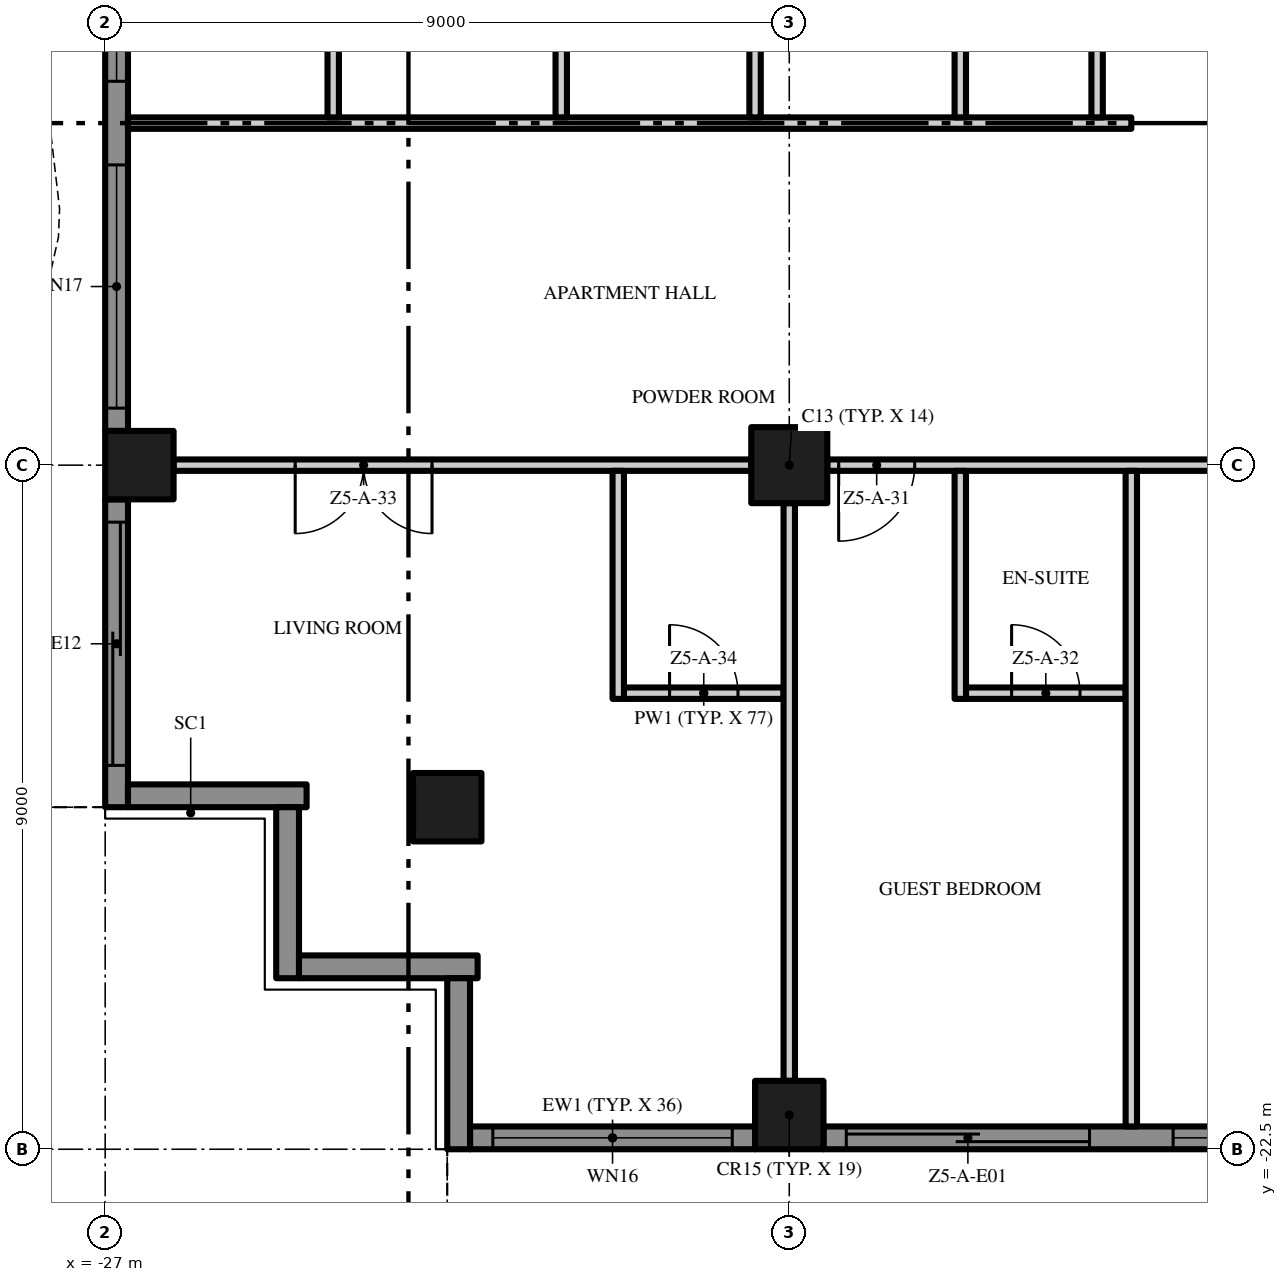
"""IFC4 building model, lengths in metres.
Left out: names, types, materials, properties, quantities, classifications, styles, units other than length and angle.
Written with IfcOpenShell. Run it as: python <this file> out.ifc"""

import sys

from ifc_helpers import new_model, si_unit, direction, frame, frame_2d, origin, origin_2d, place, context, subcontext, project, spatial, polyline, rectangle, outline, extrude, element, fill, save


model = new_model("IFC4")
c1 = context("Model", 3, precision=1e-05, world=origin(), true_north=direction((0.0, 1.0)))
c2 = subcontext(c1, "Body", "Model", "MODEL_VIEW")
j1 = project(units=[si_unit("LENGTHUNIT", "METRE"), si_unit("PLANEANGLEUNIT", "RADIAN")], contexts=[c1])
p1 = place(None, origin())
s1 = spatial("IfcSite", under=j1, at=p1, CompositionType="ELEMENT")
p2 = place(p1, origin())
s2 = spatial("IfcBuilding", under=s1, at=p2, CompositionType="ELEMENT")
p3 = place(p2, frame((0.0, 0.0, 238.8)))
s3 = spatial("IfcBuildingStorey", under=s2, at=p3, CompositionType="ELEMENT", Elevation=238.8)
p4 = place(p3, frame((-18.0, -13.5, 0.0), z_axis=(0.0, 0.0, 1.0), x_axis=(1.0, 0.0, 0.0)))
e1 = element("IfcColumn", 1, at=p4, inside=s3, PredefinedType="COLUMN", context=c2, shape_type="SweptSolid", body=[
    extrude(rectangle(XDim=1.0, YDim=1.0, at=origin_2d()), origin(), (0.0, 0.0, 1.0), 3.5),
])
for number, where, z_axis, x_axis in (
    (2, (-18.0, -22.05, 0.0), (0.0, 0.0, 1.0), (1.0, 0.0, 0.0)),
    (3, (-26.55, -13.5, 0.0), (0.0, 0.0, 1.0), (1.0, 0.0, 0.0)),
    (4, (-22.5, -18.0, 0.0), (0.0, 0.0, 1.0), (1.0, 0.0, 0.0)),
):
    element("IfcColumn", number, at=place(p3, frame(where, z_axis=z_axis, x_axis=x_axis)), inside=s3, PredefinedType="COLUMN", context=c2, shape_type="SweptSolid", body=[
        extrude(rectangle(XDim=0.9, YDim=0.9, at=origin_2d()), origin(), (0.0, 0.0, 1.0), 3.5),
    ])
p5 = place(p3, frame((-18.45, -22.35, 0.0), z_axis=(0.0, 0.0, 1.0), x_axis=(-1.0, 0.0, 0.0)))
e5 = element("IfcWall", 5, at=p5, inside=s3, PredefinedType="SOLIDWALL", context=c2, shape_type="SweptSolid", body=[
    extrude(rectangle(XDim=3.75, YDim=0.3, at=frame_2d((1.875, 0.0))), origin(), (0.0, 0.0, 1.0), 3.5),
])
p6 = place(p5, frame((0.3, 0.0, 0.45)))
e6 = element("IfcOpeningElement", 6, at=p6, cuts=e5, PredefinedType="OPENING", context=c2, shape_type="SweptSolid", body=[
    extrude(rectangle(XDim=3.15, YDim=2.65, at=frame_2d((1.575, 1.325))), frame((0.0, 0.16, 0.0), z_axis=(0.0, -1.0, 0.0), x_axis=(1.0, 0.0, 0.0)), (0.0, 0.0, 1.0), 0.32),
])
p7 = place(p3, frame((-9.45, -22.35, 0.0), z_axis=(0.0, 0.0, 1.0), x_axis=(-1.0, 0.0, 0.0)))
e7 = element("IfcWall", 7, at=p7, inside=s3, PredefinedType="SOLIDWALL", context=c2, shape_type="SweptSolid", body=[
    extrude(rectangle(XDim=8.1, YDim=0.3, at=frame_2d((4.05, 0.0))), origin(), (0.0, 0.0, 1.0), 3.5),
])
p8 = place(p7, frame((4.6, 0.0, 0.0)))
e8 = element("IfcOpeningElement", 8, at=p8, cuts=e7, PredefinedType="OPENING", context=c2, shape_type="SweptSolid", body=[
    extrude(rectangle(XDim=3.2, YDim=2.4, at=frame_2d((1.6, 1.2))), frame((0.0, 0.16, 0.0), z_axis=(0.0, -1.0, 0.0), x_axis=(1.0, 0.0, 0.0)), (0.0, 0.0, 1.0), 0.32),
])
p9 = place(p7, frame((0.3, 0.0, 0.45)))
e9 = element("IfcOpeningElement", 9, at=p9, cuts=e7, PredefinedType="OPENING", context=c2, shape_type="SweptSolid", body=[
    extrude(rectangle(XDim=3.2, YDim=2.65, at=frame_2d((1.6, 1.325))), frame((0.0, 0.16, 0.0), z_axis=(0.0, -1.0, 0.0), x_axis=(1.0, 0.0, 0.0)), (0.0, 0.0, 1.0), 0.32),
])
p10 = place(p3, frame((-26.85, -13.05, 0.0), z_axis=(0.0, 0.0, 1.0), x_axis=(0.0, 1.0, 0.0)))
e10 = element("IfcWall", 10, at=p10, inside=s3, PredefinedType="SOLIDWALL", context=c2, shape_type="SweptSolid", body=[
    extrude(rectangle(XDim=8.1, YDim=0.3, at=frame_2d((4.05, 0.0))), origin(), (0.0, 0.0, 1.0), 3.5),
])
p11 = place(p10, frame((4.6, 0.0, 0.45)))
e11 = element("IfcOpeningElement", 11, at=p11, cuts=e10, PredefinedType="OPENING", context=c2, shape_type="SweptSolid", body=[
    extrude(rectangle(XDim=3.2, YDim=2.65, at=frame_2d((1.6, 1.325))), frame((0.0, 0.16, 0.0), z_axis=(0.0, -1.0, 0.0), x_axis=(1.0, 0.0, 0.0)), (0.0, 0.0, 1.0), 0.32),
])
p12 = place(p10, frame((0.3, 0.0, 0.45)))
e12 = element("IfcOpeningElement", 12, at=p12, cuts=e10, PredefinedType="OPENING", context=c2, shape_type="SweptSolid", body=[
    extrude(rectangle(XDim=3.2, YDim=2.65, at=frame_2d((1.6, 1.325))), frame((0.0, 0.16, 0.0), z_axis=(0.0, -1.0, 0.0), x_axis=(1.0, 0.0, 0.0)), (0.0, 0.0, 1.0), 0.32),
])
p13 = place(p3, frame((-26.85, -18.0, 0.0), z_axis=(0.0, 0.0, 1.0), x_axis=(0.0, 1.0, 0.0)))
e13 = element("IfcWall", 13, at=p13, inside=s3, PredefinedType="SOLIDWALL", context=c2, shape_type="SweptSolid", body=[
    extrude(rectangle(XDim=4.05, YDim=0.3, at=frame_2d((2.025, 0.0))), origin(), (0.0, 0.0, 1.0), 3.5),
])
p14 = place(p13, frame((0.55, 0.0, 0.0)))
e14 = element("IfcOpeningElement", 14, at=p14, cuts=e13, PredefinedType="OPENING", context=c2, shape_type="SweptSolid", body=[
    extrude(rectangle(XDim=3.2, YDim=2.4, at=frame_2d((1.6, 1.2))), frame((0.0, 0.16, 0.0), z_axis=(0.0, -1.0, 0.0), x_axis=(1.0, 0.0, 0.0)), (0.0, 0.0, 1.0), 0.32),
])
p15 = place(p3, frame((-24.35, -17.85, 0.0), z_axis=(0.0, 0.0, 1.0), x_axis=(-1.0, 0.0, 0.0)))
e15 = element("IfcWall", 15, at=p15, inside=s3, PredefinedType="SOLIDWALL", context=c2, shape_type="SweptSolid", body=[
    extrude(rectangle(XDim=2.35, YDim=0.3, at=frame_2d((1.175, 0.0))), origin(), (0.0, 0.0, 1.0), 3.5),
])
p16 = place(p3, frame((-24.6, -20.25, 0.0), z_axis=(0.0, 0.0, 1.0), x_axis=(0.0, 1.0, 0.0)))
e16 = element("IfcWall", 16, at=p16, inside=s3, PredefinedType="SOLIDWALL", context=c2, shape_type="SweptSolid", body=[
    extrude(rectangle(XDim=2.25, YDim=0.3, at=frame_2d((1.125, 0.0))), origin(), (0.0, 0.0, 1.0), 3.5),
])
p17 = place(p3, frame((-22.1, -20.1, 0.0), z_axis=(0.0, 0.0, 1.0), x_axis=(-1.0, 0.0, 0.0)))
e17 = element("IfcWall", 17, at=p17, inside=s3, PredefinedType="SOLIDWALL", context=c2, shape_type="SweptSolid", body=[
    extrude(rectangle(XDim=2.35, YDim=0.3, at=frame_2d((1.175, 0.0))), origin(), (0.0, 0.0, 1.0), 3.5),
])
p18 = place(p3, frame((-22.35, -22.5, 0.0), z_axis=(0.0, 0.0, 1.0), x_axis=(0.0, 1.0, 0.0)))
e18 = element("IfcWall", 18, at=p18, inside=s3, PredefinedType="SOLIDWALL", context=c2, shape_type="SweptSolid", body=[
    extrude(rectangle(XDim=2.25, YDim=0.3, at=frame_2d((1.125, 0.0))), origin(), (0.0, 0.0, 1.0), 3.5),
])
p19 = place(p3, origin())
e19 = element("IfcWall", 19, at=p19, inside=s3, PredefinedType="USERDEFINED", context=c2, shape_type="SweptSolid", body=[
    extrude(outline(polyline([(-22.5, -23.451), (-21.0, -24.112), (-19.5, -24.845), (-18.0, -25.369), (-16.875, -25.5), (-16.5, -25.485), (-15.0, -25.149), (-13.5, -24.488), (-12.0, -23.755), (-10.5, -23.231), (-9.375, -23.1), (-9.0, -23.115), (-7.5, -23.451), (-6.0, -24.112), (-4.5, -24.845), (-3.0, -25.369), (-1.875, -25.5), (-1.5, -25.485), (0.0, -25.149), (1.5, -24.488), (3.0, -23.755), (4.5, -23.231), (5.625, -23.1), (6.0, -23.115), (7.5, -23.451), (9.0, -24.112), (10.5, -24.845), (12.0, -25.369), (13.125, -25.5), (13.5, -25.485), (15.0, -25.149), (16.5, -24.488), (18.0, -23.755), (19.5, -23.231), (20.625, -23.1), (21.0, -23.115), (22.5, -23.451), (22.555, -23.208), (21.033, -22.866), (20.615, -22.849), (19.444, -22.986), (17.904, -23.524), (16.395, -24.261), (14.921, -24.91), (13.467, -25.236), (13.135, -25.249), (12.056, -25.124), (10.596, -24.614), (9.105, -23.885), (7.579, -23.213), (6.033, -22.866), (5.615, -22.849), (4.444, -22.986), (2.904, -23.524), (1.395, -24.261), (-0.079, -24.91), (-1.533, -25.236), (-1.865, -25.249), (-2.944, -25.124), (-4.404, -24.614), (-5.895, -23.885), (-7.421, -23.213), (-8.967, -22.866), (-9.385, -22.849), (-10.556, -22.986), (-12.096, -23.524), (-13.605, -24.261), (-15.079, -24.91), (-16.533, -25.236), (-16.865, -25.249), (-17.944, -25.124), (-19.404, -24.614), (-20.895, -23.885), (-22.399, -23.223), (-22.5, -23.451)])), origin(), (0.0, 0.0, 1.0), 0.9),
])
p20 = place(p3, origin())
e20 = element("IfcWall", 20, at=p20, inside=s3, PredefinedType="USERDEFINED", context=c2, shape_type="SweptSolid", body=[
    extrude(outline(polyline([(-27.951, 18.0), (-28.612, 16.5), (-29.345, 15.0), (-29.869, 13.5), (-30.0, 12.375), (-29.985, 12.0), (-29.649, 10.5), (-28.988, 9.0), (-28.255, 7.5), (-27.731, 6.0), (-27.6, 4.875), (-27.615, 4.5), (-27.951, 3.0), (-28.612, 1.5), (-29.345, 0.0), (-29.869, -1.5), (-30.0, -2.625), (-29.985, -3.0), (-29.649, -4.5), (-28.988, -6.0), (-28.255, -7.5), (-27.731, -9.0), (-27.6, -10.125), (-27.615, -10.5), (-27.951, -12.0), (-28.612, -13.5), (-29.345, -15.0), (-29.869, -16.5), (-30.0, -17.625), (-29.985, -18.0), (-29.735, -17.99), (-29.749, -17.635), (-29.624, -16.556), (-29.114, -15.096), (-28.385, -13.605), (-27.713, -12.079), (-27.366, -10.533), (-27.349, -10.115), (-27.486, -8.944), (-28.024, -7.404), (-28.761, -5.895), (-29.41, -4.421), (-29.736, -2.967), (-29.749, -2.635), (-29.624, -1.556), (-29.114, -0.096), (-28.385, 1.395), (-27.713, 2.921), (-27.366, 4.467), (-27.349, 4.885), (-27.486, 6.056), (-28.024, 7.596), (-28.761, 9.105), (-29.41, 10.579), (-29.736, 12.033), (-29.749, 12.365), (-29.624, 13.444), (-29.114, 14.904), (-28.385, 16.395), (-27.723, 17.899), (-27.951, 18.0)])), origin(), (0.0, 0.0, 1.0), 0.9),
])
p21 = place(p3, frame((-20.175, -16.5, 0.0), z_axis=(0.0, 0.0, 1.0), x_axis=(1.0, 0.0, 0.0)))
e21 = element("IfcWall", 21, at=p21, inside=s3, PredefinedType="PARTITIONING", context=c2, shape_type="SweptSolid", body=[
    extrude(rectangle(XDim=2.1, YDim=0.15, at=frame_2d((1.05, 0.0))), origin(), (0.0, 0.0, 1.0), 3.5),
])
p22 = place(p21, frame((0.6, 0.0, 0.0)))
e22 = element("IfcOpeningElement", 22, at=p22, cuts=e21, PredefinedType="OPENING", context=c2, shape_type="SweptSolid", body=[
    extrude(rectangle(XDim=0.9, YDim=2.1, at=frame_2d((0.45, 1.05))), frame((0.0, 0.085, 0.0), z_axis=(0.0, -1.0, 0.0), x_axis=(1.0, 0.0, 0.0)), (0.0, 0.0, 1.0), 0.17),
])
p23 = place(p3, frame((-15.675, -16.5, 0.0), z_axis=(0.0, 0.0, 1.0), x_axis=(1.0, 0.0, 0.0)))
e23 = element("IfcWall", 23, at=p23, inside=s3, PredefinedType="PARTITIONING", context=c2, shape_type="SweptSolid", body=[
    extrude(rectangle(XDim=2.1, YDim=0.15, at=frame_2d((1.05, 0.0))), origin(), (0.0, 0.0, 1.0), 3.5),
])
p24 = place(p23, frame((0.6, 0.0, 0.0)))
e24 = element("IfcOpeningElement", 24, at=p24, cuts=e23, PredefinedType="OPENING", context=c2, shape_type="SweptSolid", body=[
    extrude(rectangle(XDim=0.9, YDim=2.1, at=frame_2d((0.45, 1.05))), frame((0.0, 0.085, 0.0), z_axis=(0.0, -1.0, 0.0), x_axis=(1.0, 0.0, 0.0)), (0.0, 0.0, 1.0), 0.17),
])
p25 = place(p3, frame((-18.5, -13.5, 0.0), z_axis=(0.0, 0.0, 1.0), x_axis=(-1.0, 0.0, 0.0)))
e25 = element("IfcWall", 25, at=p25, inside=s3, PredefinedType="PARTITIONING", context=c2, shape_type="SweptSolid", body=[
    extrude(rectangle(XDim=7.6, YDim=0.15, at=frame_2d((3.8, 0.0))), origin(), (0.0, 0.0, 1.0), 3.5),
])
p26 = place(p25, frame((4.2, 0.0, 0.0)))
e26 = element("IfcOpeningElement", 26, at=p26, cuts=e25, PredefinedType="OPENING", context=c2, shape_type="SweptSolid", body=[
    extrude(rectangle(XDim=1.8, YDim=2.4, at=frame_2d((0.9, 1.2))), frame((0.0, 0.085, 0.0), z_axis=(0.0, -1.0, 0.0), x_axis=(1.0, 0.0, 0.0)), (0.0, 0.0, 1.0), 0.17),
])
p27 = place(p3, frame((-9.5, -13.5, 0.0), z_axis=(0.0, 0.0, 1.0), x_axis=(-1.0, 0.0, 0.0)))
e27 = element("IfcWall", 27, at=p27, inside=s3, PredefinedType="PARTITIONING", context=c2, shape_type="SweptSolid", body=[
    extrude(rectangle(XDim=8.0, YDim=0.15, at=frame_2d((4.0, 0.0))), origin(), (0.0, 0.0, 1.0), 3.5),
])
p28 = place(p27, frame((1.25, 0.0, 0.0)))
e28 = element("IfcOpeningElement", 28, at=p28, cuts=e27, PredefinedType="OPENING", context=c2, shape_type="SweptSolid", body=[
    extrude(rectangle(XDim=1.0, YDim=2.4, at=frame_2d((0.5, 1.2))), frame((0.0, 0.085, 0.0), z_axis=(0.0, -1.0, 0.0), x_axis=(1.0, 0.0, 0.0)), (0.0, 0.0, 1.0), 0.17),
])
p29 = place(p27, frame((6.85, 0.0, 0.0)))
e29 = element("IfcOpeningElement", 29, at=p29, cuts=e27, PredefinedType="OPENING", context=c2, shape_type="SweptSolid", body=[
    extrude(rectangle(XDim=1.0, YDim=2.4, at=frame_2d((0.5, 1.2))), frame((0.0, 0.085, 0.0), z_axis=(0.0, -1.0, 0.0), x_axis=(1.0, 0.0, 0.0)), (0.0, 0.0, 1.0), 0.17),
])
p30 = place(p3, frame((-26.7, -9.0, 0.0), z_axis=(0.0, 0.0, 1.0), x_axis=(1.0, 0.0, 0.0)))
e30 = element("IfcWall", 30, at=p30, inside=s3, PredefinedType="PARTITIONING", context=c2, shape_type="SweptSolid", body=[
    extrude(rectangle(XDim=13.2, YDim=0.15, at=frame_2d((6.6, 0.0))), origin(), (0.0, 0.0, 1.0), 3.5),
])
for number, where, z_axis, x_axis in (
    (31, (-24.0, -8.925, 0.0), (0.0, 0.0, 1.0), (0.0, 1.0, 0.0)),
    (32, (-21.0, -8.925, 0.0), (0.0, 0.0, 1.0), (0.0, 1.0, 0.0)),
):
    element("IfcWall", number, at=place(p3, frame(where, z_axis=z_axis, x_axis=x_axis)), inside=s3, PredefinedType="PARTITIONING", context=c2, shape_type="SweptSolid", body=[
        extrude(rectangle(XDim=4.35, YDim=0.15, at=frame_2d((2.175, 0.0))), origin(), (0.0, 0.0, 1.0), 3.5),
    ])
p31 = place(p3, frame((-20.25, -16.575, 0.0), z_axis=(0.0, 0.0, 1.0), x_axis=(0.0, 1.0, 0.0)))
e33 = element("IfcWall", 33, at=p31, inside=s3, PredefinedType="PARTITIONING", context=c2, shape_type="SweptSolid", body=[
    extrude(rectangle(XDim=3.0, YDim=0.15, at=frame_2d((1.5, 0.0))), origin(), (0.0, 0.0, 1.0), 3.5),
])
p32 = place(p3, frame((-18.45, -8.925, 0.0), z_axis=(0.0, 0.0, 1.0), x_axis=(0.0, 1.0, 0.0)))
e34 = element("IfcWall", 34, at=p32, inside=s3, PredefinedType="PARTITIONING", context=c2, shape_type="SweptSolid", body=[
    extrude(rectangle(XDim=3.925, YDim=0.15, at=frame_2d((1.962, 0.0))), origin(), (0.0, 0.0, 1.0), 3.5),
])
p33 = place(p3, frame((-18.0, -21.6, 0.0), z_axis=(0.0, 0.0, 1.0), x_axis=(0.0, 1.0, 0.0)))
e35 = element("IfcWall", 35, at=p33, inside=s3, PredefinedType="PARTITIONING", context=c2, shape_type="SweptSolid", body=[
    extrude(rectangle(XDim=7.6, YDim=0.15, at=frame_2d((3.8, 0.0))), origin(), (0.0, 0.0, 1.0), 3.5),
])
p34 = place(p3, frame((-15.75, -16.575, 0.0), z_axis=(0.0, 0.0, 1.0), x_axis=(0.0, 1.0, 0.0)))
e36 = element("IfcWall", 36, at=p34, inside=s3, PredefinedType="PARTITIONING", context=c2, shape_type="SweptSolid", body=[
    extrude(rectangle(XDim=3.0, YDim=0.15, at=frame_2d((1.5, 0.0))), origin(), (0.0, 0.0, 1.0), 3.5),
])
p35 = place(p3, frame((-15.75, -8.925, 0.0), z_axis=(0.0, 0.0, 1.0), x_axis=(0.0, 1.0, 0.0)))
e37 = element("IfcWall", 37, at=p35, inside=s3, PredefinedType="PARTITIONING", context=c2, shape_type="SweptSolid", body=[
    extrude(rectangle(XDim=4.35, YDim=0.15, at=frame_2d((2.175, 0.0))), origin(), (0.0, 0.0, 1.0), 3.5),
])
p36 = place(p3, frame((-13.95, -8.925, 0.0), z_axis=(0.0, 0.0, 1.0), x_axis=(0.0, 1.0, 0.0)))
e38 = element("IfcWall", 38, at=p36, inside=s3, PredefinedType="PARTITIONING", context=c2, shape_type="SweptSolid", body=[
    extrude(rectangle(XDim=4.5, YDim=0.15, at=frame_2d((2.25, 0.0))), origin(), (0.0, 0.0, 1.0), 3.5),
])
p37 = place(p3, frame((-13.5, -22.2, 0.0), z_axis=(0.0, 0.0, 1.0), x_axis=(0.0, 1.0, 0.0)))
e39 = element("IfcWall", 39, at=p37, inside=s3, PredefinedType="PARTITIONING", context=c2, shape_type="SweptSolid", body=[
    extrude(rectangle(XDim=8.625, YDim=0.15, at=frame_2d((4.312, 0.0))), origin(), (0.0, 0.0, 1.0), 3.5),
])
p38 = place(p6, origin())
e40 = element("IfcWindow", 40, at=p38, inside=s3, PartitioningType="SINGLE_PANEL", PredefinedType="WINDOW", context=c2, shape_type="SweptSolid", body=[
    extrude(rectangle(XDim=3.15, YDim=2.65, at=frame_2d((1.575, 1.325))), frame((0.0, 0.03, 0.0), z_axis=(0.0, -1.0, 0.0), x_axis=(1.0, 0.0, 0.0)), (0.0, 0.0, 1.0), 0.06),
])
fill(e6, e40)
p39 = place(p8, origin())
e41 = element("IfcDoor", 41, at=p39, inside=s3, OperationType="SINGLE_SWING_LEFT", PredefinedType="DOOR", context=c2, shape_type="SweptSolid", body=[
    extrude(rectangle(XDim=3.2, YDim=2.4, at=frame_2d((1.6, 1.2))), frame((0.0, 0.025, 0.0), z_axis=(0.0, -1.0, 0.0), x_axis=(1.0, 0.0, 0.0)), (0.0, 0.0, 1.0), 0.05),
])
fill(e8, e41)
p40 = place(p9, origin())
e42 = element("IfcWindow", 42, at=p40, inside=s3, PartitioningType="SINGLE_PANEL", PredefinedType="WINDOW", context=c2, shape_type="SweptSolid", body=[
    extrude(rectangle(XDim=3.2, YDim=2.65, at=frame_2d((1.6, 1.325))), frame((0.0, 0.03, 0.0), z_axis=(0.0, -1.0, 0.0), x_axis=(1.0, 0.0, 0.0)), (0.0, 0.0, 1.0), 0.06),
])
fill(e9, e42)
p41 = place(p11, origin())
e43 = element("IfcWindow", 43, at=p41, inside=s3, PartitioningType="SINGLE_PANEL", PredefinedType="WINDOW", context=c2, shape_type="SweptSolid", body=[
    extrude(rectangle(XDim=3.2, YDim=2.65, at=frame_2d((1.6, 1.325))), frame((0.0, 0.03, 0.0), z_axis=(0.0, -1.0, 0.0), x_axis=(1.0, 0.0, 0.0)), (0.0, 0.0, 1.0), 0.06),
])
fill(e11, e43)
p42 = place(p12, origin())
e44 = element("IfcWindow", 44, at=p42, inside=s3, PartitioningType="SINGLE_PANEL", PredefinedType="WINDOW", context=c2, shape_type="SweptSolid", body=[
    extrude(rectangle(XDim=3.2, YDim=2.65, at=frame_2d((1.6, 1.325))), frame((0.0, 0.03, 0.0), z_axis=(0.0, -1.0, 0.0), x_axis=(1.0, 0.0, 0.0)), (0.0, 0.0, 1.0), 0.06),
])
fill(e12, e44)
p43 = place(p14, origin())
e45 = element("IfcDoor", 45, at=p43, inside=s3, OperationType="SINGLE_SWING_LEFT", PredefinedType="DOOR", context=c2, shape_type="SweptSolid", body=[
    extrude(rectangle(XDim=3.2, YDim=2.4, at=frame_2d((1.6, 1.2))), frame((0.0, 0.025, 0.0), z_axis=(0.0, -1.0, 0.0), x_axis=(1.0, 0.0, 0.0)), (0.0, 0.0, 1.0), 0.05),
])
fill(e14, e45)
p44 = place(p29, origin())
e46 = element("IfcDoor", 46, at=p44, inside=s3, OperationType="SINGLE_SWING_RIGHT", PredefinedType="DOOR", context=c2, shape_type="SweptSolid", body=[
    extrude(rectangle(XDim=1.0, YDim=2.4, at=frame_2d((0.5, 1.2))), frame((0.0, 0.025, 0.0), z_axis=(0.0, -1.0, 0.0), x_axis=(1.0, 0.0, 0.0)), (0.0, 0.0, 1.0), 0.05),
])
fill(e29, e46)
p45 = place(p24, origin())
e47 = element("IfcDoor", 47, at=p45, inside=s3, OperationType="SINGLE_SWING_LEFT", PredefinedType="DOOR", context=c2, shape_type="SweptSolid", body=[
    extrude(rectangle(XDim=0.9, YDim=2.1, at=frame_2d((0.45, 1.05))), frame((0.0, 0.025, 0.0), z_axis=(0.0, -1.0, 0.0), x_axis=(1.0, 0.0, 0.0)), (0.0, 0.0, 1.0), 0.05),
])
fill(e24, e47)
p46 = place(p26, origin())
e48 = element("IfcDoor", 48, at=p46, inside=s3, OperationType="DOUBLE_DOOR_SINGLE_SWING", PredefinedType="DOOR", context=c2, shape_type="SweptSolid", body=[
    extrude(rectangle(XDim=1.8, YDim=2.4, at=frame_2d((0.9, 1.2))), frame((0.0, 0.025, 0.0), z_axis=(0.0, -1.0, 0.0), x_axis=(1.0, 0.0, 0.0)), (0.0, 0.0, 1.0), 0.05),
])
fill(e26, e48)
p47 = place(p22, origin())
e49 = element("IfcDoor", 49, at=p47, inside=s3, OperationType="SINGLE_SWING_LEFT", PredefinedType="DOOR", context=c2, shape_type="SweptSolid", body=[
    extrude(rectangle(XDim=0.9, YDim=2.1, at=frame_2d((0.45, 1.05))), frame((0.0, 0.025, 0.0), z_axis=(0.0, -1.0, 0.0), x_axis=(1.0, 0.0, 0.0)), (0.0, 0.0, 1.0), 0.05),
])
fill(e22, e49)
save(model, sys.argv[1])
